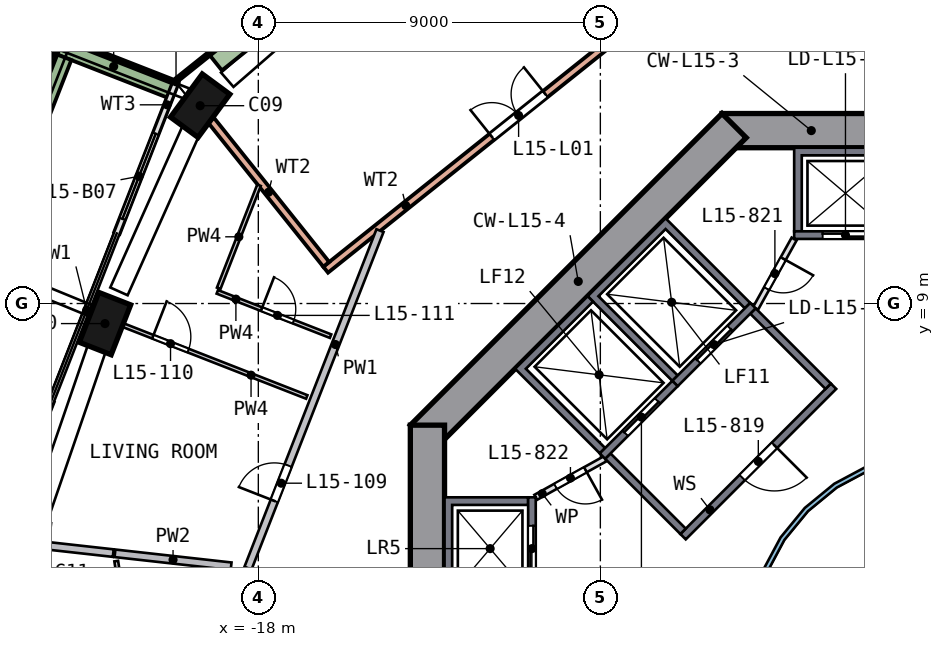
"""IFC4 building model, lengths in metres.
Left out: names, types, materials, properties, quantities, classifications, styles, units other than length and angle.
Written with IfcOpenShell. Run it as: python <this file> out.ifc"""

import sys

from ifc_helpers import new_model, si_unit, direction, frame, frame_2d, origin, origin_2d, place, context, subcontext, project, spatial, polyline, rectangle, outline, extrude, element, fill, save


model = new_model("IFC4")
c1 = context("Model", 3, precision=1e-05, world=origin(), true_north=direction((0.0, 1.0)))
c2 = subcontext(c1, "Body", "Model", "MODEL_VIEW")
j1 = project(units=[si_unit("LENGTHUNIT", "METRE"), si_unit("PLANEANGLEUNIT", "RADIAN")], contexts=[c1])
p1 = place(None, origin())
s1 = spatial("IfcSite", under=j1, at=p1, CompositionType="ELEMENT")
p2 = place(p1, origin())
s2 = spatial("IfcBuilding", under=s1, at=p2, CompositionType="ELEMENT")
p3 = place(p2, frame((0.0, 0.0, 68.0)))
s3 = spatial("IfcBuildingStorey", under=s2, at=p3, CompositionType="ELEMENT", Elevation=68.0)
p4 = place(p3, frame((-19.449, 14.318, 0.0), z_axis=(-0.067284962, -0.093058524, 0.99338454), x_axis=(0.588862787, 0.800033999, 0.114831255)))
e1 = element("IfcColumn", 1, at=p4, inside=s3, PredefinedType="COLUMN", context=c2, shape_type="SweptSolid", body=[
    extrude(rectangle(XDim=1.4, YDim=0.9, at=origin_2d()), origin(), (0.0, 0.0, 1.0), 3.211),
])
p5 = place(p3, frame((-21.987, 8.599, 0.0), z_axis=(-0.040002437, -0.104949359, 0.993672701), x_axis=(-0.361776799, -0.925474949, -0.112310579)))
e2 = element("IfcColumn", 2, at=p5, inside=s3, PredefinedType="COLUMN", context=c2, shape_type="SweptSolid", body=[
    extrude(rectangle(XDim=1.4, YDim=0.9, at=origin_2d()), origin(), (0.0, 0.0, 1.0), 3.21),
])
p6 = place(p3, frame((5.799, 13.55, 0.0), z_axis=(0.0, 0.0, 1.0), x_axis=(-1.0, 0.0, 0.0)))
e3 = element("IfcWall", 3, at=p6, inside=s3, PredefinedType="SHEAR", context=c2, shape_type="SweptSolid", body=[
    extrude(rectangle(XDim=11.598, YDim=0.9, at=frame_2d((5.799, 0.0))), origin(), (0.0, 0.0, 1.0), 3.5),
])
p7 = place(p6, frame((4.899, 0.0, 0.0)))
e4 = element("IfcOpeningElement", 4, at=p7, cuts=e3, PredefinedType="OPENING", context=c2, shape_type="SweptSolid", body=[
    extrude(rectangle(XDim=1.8, YDim=2.1, at=frame_2d((0.9, 1.05))), frame((0.0, 0.46, 0.0), z_axis=(0.0, -1.0, 0.0), x_axis=(1.0, 0.0, 0.0)), (0.0, 0.0, 1.0), 0.92),
])
p8 = place(p3, frame((-5.481, 13.682, 0.0), z_axis=(0.0, 0.0, 1.0), x_axis=(-0.707106781, -0.707106781, 0.0)))
e5 = element("IfcWall", 5, at=p8, inside=s3, PredefinedType="SHEAR", context=c2, shape_type="SweptSolid", body=[
    extrude(rectangle(XDim=11.598, YDim=0.9, at=frame_2d((5.799, 0.0))), origin(), (0.0, 0.0, 1.0), 3.5),
])
p9 = place(p3, frame((-13.55, 5.799, 0.0), z_axis=(0.0, 0.0, 1.0), x_axis=(0.0, -1.0, 0.0)))
e6 = element("IfcWall", 6, at=p9, inside=s3, PredefinedType="SHEAR", context=c2, shape_type="SweptSolid", body=[
    extrude(rectangle(XDim=11.598, YDim=0.9, at=frame_2d((5.799, 0.0))), origin(), (0.0, 0.0, 1.0), 3.5),
])
p10 = place(p9, frame((4.899, 0.0, 0.0)))
e7 = element("IfcOpeningElement", 7, at=p10, cuts=e6, PredefinedType="OPENING", context=c2, shape_type="SweptSolid", body=[
    extrude(rectangle(XDim=1.8, YDim=2.1, at=frame_2d((0.9, 1.05))), frame((0.0, 0.46, 0.0), z_axis=(0.0, -1.0, 0.0), x_axis=(1.0, 0.0, 0.0)), (0.0, 0.0, 1.0), 0.92),
])
p11 = place(p3, frame((-20.177, 14.806, 0.0), z_axis=(0.0, 0.0, 1.0), x_axis=(-0.364229957, -0.931309046, 0.0)))
e8 = element("IfcWall", 8, at=p11, inside=s3, PredefinedType="SOLIDWALL", context=c2, shape_type="SweptSolid", body=[
    extrude(rectangle(XDim=4.239, YDim=0.15, at=frame_2d((2.12, 0.0))), origin(), (0.0, 0.0, 1.0), 2.425),
])
p12 = place(p11, frame((1.439, 0.0, 0.0)))
e9 = element("IfcOpeningElement", 9, at=p12, cuts=e8, PredefinedType="OPENING", context=c2, shape_type="SweptSolid", body=[
    extrude(rectangle(XDim=2.4, YDim=2.4, at=frame_2d((1.2, 1.2))), frame((0.0, 0.085, 0.0), z_axis=(0.0, -1.0, 0.0), x_axis=(1.0, 0.0, 0.0)), (0.0, 0.0, 1.0), 0.17),
])
p13 = place(p3, frame((-23.454, 6.426, 0.0), z_axis=(0.0, 0.0, 1.0), x_axis=(-0.364257976, -0.931298087, 0.0)))
e10 = element("IfcWall", 10, at=p13, inside=s3, PredefinedType="SOLIDWALL", context=c2, shape_type="SweptSolid", body=[
    extrude(rectangle(XDim=3.842, YDim=0.15, at=frame_2d((1.921, 0.0))), origin(), (0.0, 0.0, 1.0), 2.425),
])
p14 = place(p13, frame((0.4, 0.0, 0.0)))
e11 = element("IfcOpeningElement", 11, at=p14, cuts=e10, PredefinedType="OPENING", context=c2, shape_type="SweptSolid", body=[
    extrude(rectangle(XDim=2.4, YDim=2.4, at=frame_2d((1.2, 1.2))), frame((0.0, 0.085, 0.0), z_axis=(0.0, -1.0, 0.0), x_axis=(1.0, 0.0, 0.0)), (0.0, 0.0, 1.0), 0.17),
])
p15 = place(p3, frame((-20.317, 14.656, 0.0), z_axis=(0.0, 0.0, 1.0), x_axis=(-0.931296817, 0.364261223, 0.0)))
e12 = element("IfcWall", 12, at=p15, inside=s3, PredefinedType="SOLIDWALL", context=c2, shape_type="SweptSolid", body=[
    extrude(rectangle(XDim=3.199, YDim=0.5, at=frame_2d((1.6, 0.0))), origin(), (0.0, 0.0, 1.0), 0.7),
])
p16 = place(p3, frame((-23.154, 15.498, 0.0), z_axis=(0.0, 0.0, 1.0), x_axis=(-0.364230183, -0.931308957, 0.0)))
e13 = element("IfcWall", 13, at=p16, inside=s3, PredefinedType="SOLIDWALL", context=c2, shape_type="SweptSolid", body=[
    extrude(rectangle(XDim=13.224, YDim=0.5, at=frame_2d((6.612, 0.0))), origin(), (0.0, 0.0, 1.0), 0.7),
])
p17 = place(p3, frame((-16.228, 9.89, 0.0), z_axis=(0.0, 0.0, 1.0), x_axis=(0.781086795, 0.624422468, 0.0)))
e14 = element("IfcWall", 14, at=p17, inside=s3, PredefinedType="SOLIDWALL", context=c2, shape_type="SweptSolid", body=[
    extrude(rectangle(XDim=13.0, YDim=0.2, at=frame_2d((6.5, 0.0))), origin(), (0.0, 0.0, 1.0), 3.19),
])
p18 = place(p17, frame((5.6, 0.0, 0.0)))
e15 = element("IfcOpeningElement", 15, at=p18, cuts=e14, PredefinedType="OPENING", context=c2, shape_type="SweptSolid", body=[
    extrude(rectangle(XDim=1.8, YDim=2.4, at=frame_2d((0.9, 1.2))), frame((0.0, 0.11, 0.0), z_axis=(0.0, -1.0, 0.0), x_axis=(1.0, 0.0, 0.0)), (0.0, 0.0, 1.0), 0.22),
])
p19 = place(p3, frame((-19.248, 13.827, 0.0), z_axis=(0.0, 0.0, 1.0), x_axis=(0.624425498, -0.781084373, 0.0)))
e16 = element("IfcWall", 16, at=p19, inside=s3, PredefinedType="SOLIDWALL", context=c2, shape_type="SweptSolid", body=[
    extrude(rectangle(XDim=4.861, YDim=0.2, at=frame_2d((2.43, 0.0))), origin(), (0.0, 0.0, 1.0), 3.19),
])
p20 = place(p3, frame((-10.102, 22.917, 0.0), z_axis=(0.0, 0.0, 1.0), x_axis=(-0.781083948, -0.624426029, 0.0)))
e17 = element("IfcWall", 17, at=p20, inside=s3, PredefinedType="SOLIDWALL", context=c2, shape_type="SweptSolid", body=[
    extrude(rectangle(XDim=12.84, YDim=0.1, at=frame_2d((6.42, 0.0))), origin(), (0.0, 0.0, 1.0), 0.7),
])
p21 = place(p3, frame((-15.835, 17.95, 0.0), z_axis=(0.0, 0.0, 1.0), x_axis=(-0.781095726, -0.624411296, 0.0)))
e18 = element("IfcWall", 18, at=p21, inside=s3, PredefinedType="SOLIDWALL", context=c2, shape_type="SweptSolid", body=[
    extrude(rectangle(XDim=4.198, YDim=0.5, at=frame_2d((2.099, 0.0))), origin(), (0.0, 0.0, 1.0), 0.7),
])
p22 = place(p3, origin())
e19 = element("IfcWall", 19, at=p22, inside=s3, PredefinedType="SOLIDWALL", context=c2, shape_type="SweptSolid", body=[
    extrude(outline(polyline([(-3.9, 10.9), (-3.9, 13.1), (-1.2, 13.1), (-1.2, 10.9), (-1.4, 10.9), (-1.4, 12.9), (-3.7, 12.9), (-3.7, 10.9), (-3.9, 10.9)])), origin(), (0.0, 0.0, 1.0), 3.19),
])
p23 = place(p3, frame((-1.2, 10.8, 0.0), z_axis=(0.0, 0.0, 1.0), x_axis=(-1.0, 0.0, 0.0)))
e20 = element("IfcWall", 20, at=p23, inside=s3, PredefinedType="SOLIDWALL", context=c2, shape_type="SweptSolid", body=[
    extrude(rectangle(XDim=2.7, YDim=0.2, at=frame_2d((1.35, 0.0))), origin(), (0.0, 0.0, 1.0), 3.19),
])
p24 = place(p23, frame((0.75, 0.0, 0.0)))
e21 = element("IfcOpeningElement", 21, at=p24, cuts=e20, PredefinedType="OPENING", context=c2, shape_type="SweptSolid", body=[
    extrude(rectangle(XDim=1.2, YDim=2.1, at=frame_2d((0.6, 1.05))), frame((0.0, 0.11, 0.0), z_axis=(0.0, -1.0, 0.0), x_axis=(1.0, 0.0, 0.0)), (0.0, 0.0, 1.0), 0.22),
])
p25 = place(p3, origin())
e22 = element("IfcWall", 22, at=p25, inside=s3, PredefinedType="SOLIDWALL", context=c2, shape_type="SweptSolid", body=[
    extrude(outline(polyline([(-13.1, 3.9), (-10.9, 3.9), (-10.9, 3.7), (-12.9, 3.7), (-12.9, 1.4), (-10.9, 1.4), (-10.9, 1.2), (-13.1, 1.2), (-13.1, 3.9)])), origin(), (0.0, 0.0, 1.0), 3.19),
])
p26 = place(p3, frame((-10.8, 1.2, 0.0), z_axis=(0.0, 0.0, 1.0), x_axis=(0.0, 1.0, 0.0)))
e23 = element("IfcWall", 23, at=p26, inside=s3, PredefinedType="SOLIDWALL", context=c2, shape_type="SweptSolid", body=[
    extrude(rectangle(XDim=2.7, YDim=0.2, at=frame_2d((1.35, 0.0))), origin(), (0.0, 0.0, 1.0), 3.19),
])
p27 = place(p26, frame((0.75, 0.0, 0.0)))
e24 = element("IfcOpeningElement", 24, at=p27, cuts=e23, PredefinedType="OPENING", context=c2, shape_type="SweptSolid", body=[
    extrude(rectangle(XDim=1.2, YDim=2.1, at=frame_2d((0.6, 1.05))), frame((0.0, 0.11, 0.0), z_axis=(0.0, -1.0, 0.0), x_axis=(1.0, 0.0, 0.0)), (0.0, 0.0, 1.0), 0.22),
])
p28 = place(p3, origin())
e25 = element("IfcWall", 25, at=p28, inside=s3, PredefinedType="SOLIDWALL", context=c2, shape_type="SweptSolid", body=[
    extrude(outline(polyline([(-9.334, 9.192), (-7.283, 11.243), (-5.056, 9.016), (-5.197, 8.874), (-7.283, 10.96), (-9.051, 9.192), (-6.965, 7.106), (-7.106, 6.965), (-9.334, 9.192)])), origin(), (0.0, 0.0, 1.0), 3.19),
])
p29 = place(p3, frame((-4.985, 8.945, 0.0), z_axis=(0.0, 0.0, 1.0), x_axis=(-0.707106781, -0.707106781, 0.0)))
e26 = element("IfcWall", 26, at=p29, inside=s3, PredefinedType="SOLIDWALL", context=c2, shape_type="SweptSolid", body=[
    extrude(rectangle(XDim=2.9, YDim=0.2, at=frame_2d((1.45, 0.0))), origin(), (0.0, 0.0, 1.0), 3.19),
])
p30 = place(p29, frame((0.85, 0.0, 0.0)))
e27 = element("IfcOpeningElement", 27, at=p30, cuts=e26, PredefinedType="OPENING", context=c2, shape_type="SweptSolid", body=[
    extrude(rectangle(XDim=1.2, YDim=2.1, at=frame_2d((0.6, 1.05))), frame((0.0, 0.11, 0.0), z_axis=(0.0, -1.0, 0.0), x_axis=(1.0, 0.0, 0.0)), (0.0, 0.0, 1.0), 0.22),
])
p31 = place(p3, origin())
e28 = element("IfcWall", 28, at=p31, inside=s3, PredefinedType="SOLIDWALL", context=c2, shape_type="SweptSolid", body=[
    extrude(outline(polyline([(-11.243, 7.283), (-9.334, 9.192), (-9.192, 9.051), (-10.96, 7.283), (-8.874, 5.197), (-9.016, 5.056), (-11.243, 7.283)])), origin(), (0.0, 0.0, 1.0), 3.19),
])
p32 = place(p3, frame((-7.036, 6.894, 0.0), z_axis=(0.0, 0.0, 1.0), x_axis=(-0.707106781, -0.707106781, 0.0)))
e29 = element("IfcWall", 29, at=p32, inside=s3, PredefinedType="SOLIDWALL", context=c2, shape_type="SweptSolid", body=[
    extrude(rectangle(XDim=2.7, YDim=0.2, at=frame_2d((1.35, 0.0))), origin(), (0.0, 0.0, 1.0), 3.19),
])
p33 = place(p32, frame((0.65, 0.0, 0.0)))
e30 = element("IfcOpeningElement", 30, at=p33, cuts=e29, PredefinedType="OPENING", context=c2, shape_type="SweptSolid", body=[
    extrude(rectangle(XDim=1.2, YDim=2.1, at=frame_2d((0.6, 1.05))), frame((0.0, 0.11, 0.0), z_axis=(0.0, -1.0, 0.0), x_axis=(1.0, 0.0, 0.0)), (0.0, 0.0, 1.0), 0.22),
])
p34 = place(p3, frame((-2.864, 6.823, 0.0), z_axis=(0.0, 0.0, 1.0), x_axis=(-0.707106781, -0.707106781, 0.0)))
e31 = element("IfcWall", 31, at=p34, inside=s3, PredefinedType="SOLIDWALL", context=c2, shape_type="SweptSolid", body=[
    extrude(rectangle(XDim=5.6, YDim=0.2, at=frame_2d((2.8, 0.0))), origin(), (0.0, 0.0, 1.0), 3.19),
])
p35 = place(p34, frame((2.2, 0.0, 0.0)))
e32 = element("IfcOpeningElement", 32, at=p35, cuts=e31, PredefinedType="OPENING", context=c2, shape_type="SweptSolid", body=[
    extrude(rectangle(XDim=1.2, YDim=2.1, at=frame_2d((0.6, 1.05))), frame((0.0, 0.11, 0.0), z_axis=(0.0, -1.0, 0.0), x_axis=(1.0, 0.0, 0.0)), (0.0, 0.0, 1.0), 0.22),
])
for number, where, z_axis, x_axis in (
    (33, (-3.005, 6.823, 0.0), (0.0, 0.0, 1.0), (-0.707, 0.707, 0.0)),
    (34, (-6.823, 3.005, 0.0), (0.0, 0.0, 1.0), (-0.707, 0.707, 0.0)),
):
    element("IfcWall", number, at=place(p3, frame(where, z_axis=z_axis, x_axis=x_axis)), inside=s3, PredefinedType="SOLIDWALL", context=c2, shape_type="SweptSolid", body=[
        extrude(rectangle(XDim=2.8, YDim=0.2, at=frame_2d((1.4, 0.0))), origin(), (0.0, 0.0, 1.0), 3.19),
    ])
p36 = place(p3, frame((-3.9, 10.7, 0.0), z_axis=(0.0, 0.0, 1.0), x_axis=(-0.485692555, -0.874129705, 0.0)))
e35 = element("IfcWall", 35, at=p36, inside=s3, PredefinedType="PARTITIONING", context=c2, shape_type="SweptSolid", body=[
    extrude(rectangle(XDim=2.089, YDim=0.15, at=frame_2d((1.044, 0.0))), origin(), (0.0, 0.0, 1.0), 3.19),
])
p37 = place(p36, frame((0.594, 0.0, 0.0)))
e36 = element("IfcOpeningElement", 36, at=p37, cuts=e35, PredefinedType="OPENING", context=c2, shape_type="SweptSolid", body=[
    extrude(rectangle(XDim=0.9, YDim=2.1, at=frame_2d((0.45, 1.05))), frame((0.0, 0.085, 0.0), z_axis=(0.0, -1.0, 0.0), x_axis=(1.0, 0.0, 0.0)), (0.0, 0.0, 1.0), 0.17),
])
p38 = place(p3, frame((-8.874, 4.914, 0.0), z_axis=(0.0, 0.0, 1.0), x_axis=(-0.874129705, -0.485692555, 0.0)))
e37 = element("IfcWall", 37, at=p38, inside=s3, PredefinedType="PARTITIONING", context=c2, shape_type="SweptSolid", body=[
    extrude(rectangle(XDim=2.089, YDim=0.15, at=frame_2d((1.044, 0.0))), origin(), (0.0, 0.0, 1.0), 3.19),
])
p39 = place(p38, frame((0.594, 0.0, 0.0)))
e38 = element("IfcOpeningElement", 38, at=p39, cuts=e37, PredefinedType="OPENING", context=c2, shape_type="SweptSolid", body=[
    extrude(rectangle(XDim=0.9, YDim=2.1, at=frame_2d((0.45, 1.05))), frame((0.0, 0.085, 0.0), z_axis=(0.0, -1.0, 0.0), x_axis=(1.0, 0.0, 0.0)), (0.0, 0.0, 1.0), 0.17),
])
p40 = place(p3, origin())
e39 = element("IfcWall", 39, at=p40, inside=s3, PredefinedType="SOLIDWALL", context=c2, shape_type="SweptSolid", body=[
    extrude(outline(polyline([(5.021, -0.999), (4.73, -1.959), (4.257, -2.844), (3.62, -3.62), (2.844, -4.257), (1.959, -4.73), (0.999, -5.021), (0.0, -5.12), (-0.999, -5.021), (-1.959, -4.73), (-2.844, -4.257), (-3.62, -3.62), (-4.257, -2.844), (-4.73, -1.959), (-5.021, -0.999), (-5.12, 0.0), (-5.021, 0.999), (-4.73, 1.959), (-4.257, 2.844), (-3.62, 3.62), (-2.844, 4.257), (-1.959, 4.73), (-0.999, 5.021), (0.0, 5.12), (0.999, 5.021), (1.959, 4.73), (2.844, 4.257), (3.62, 3.62), (4.257, 2.844), (4.73, 1.959), (5.021, 0.999), (5.12, 0.0), (5.021, -0.999)]), holes=[polyline([(4.904, 0.976), (4.619, 1.913), (4.157, 2.778), (3.535, 3.535), (2.778, 4.157), (1.913, 4.619), (0.976, 4.904), (0.0, 5.0), (-0.976, 4.904), (-1.913, 4.619), (-2.778, 4.157), (-3.535, 3.535), (-4.157, 2.778), (-4.619, 1.913), (-4.904, 0.976), (-5.0, 0.0), (-4.904, -0.976), (-4.619, -1.913), (-4.157, -2.778), (-3.535, -3.535), (-2.778, -4.157), (-1.913, -4.619), (-0.976, -4.904), (0.0, -5.0), (0.976, -4.904), (1.913, -4.619), (2.778, -4.157), (3.535, -3.535), (4.157, -2.778), (4.619, -1.913), (4.904, -0.976), (5.0, 0.0), (4.904, 0.976)])]), origin(), (0.0, 0.0, 1.0), 3.19),
])
p41 = place(p3, frame((-18.271, 2.037, 0.0), z_axis=(0.0, 0.0, 1.0), x_axis=(0.364215942, 0.931314527, 0.0)))
e40 = element("IfcWall", 40, at=p41, inside=s3, PredefinedType="SOLIDWALL", context=c2, shape_type="SweptSolid", body=[
    extrude(rectangle(XDim=9.537, YDim=0.2, at=frame_2d((4.768, 0.0))), origin(), (0.0, 0.0, 1.0), 3.19),
])
p42 = place(p41, frame((1.9, 0.0, 0.0)))
e41 = element("IfcOpeningElement", 41, at=p42, cuts=e40, PredefinedType="OPENING", context=c2, shape_type="SweptSolid", body=[
    extrude(rectangle(XDim=1.0, YDim=2.1, at=frame_2d((0.5, 1.05))), frame((0.0, 0.11, 0.0), z_axis=(0.0, -1.0, 0.0), x_axis=(1.0, 0.0, 0.0)), (0.0, 0.0, 1.0), 0.22),
])
p43 = place(p3, frame((-21.817, 2.432, 0.0), z_axis=(0.0, 0.0, 1.0), x_axis=(-0.993849082, 0.110742952, 0.0)))
e42 = element("IfcWall", 42, at=p43, inside=s3, PredefinedType="SOLIDWALL", context=c2, shape_type="SweptSolid", body=[
    extrude(rectangle(XDim=3.011, YDim=0.2, at=frame_2d((1.506, 0.0))), origin(), (0.0, 0.0, 1.0), 2.69),
])
p44 = place(p3, frame((-18.716, 2.086, 0.0), z_axis=(0.0, 0.0, 1.0), x_axis=(-0.993846884, 0.110762675, 0.0)))
e43 = element("IfcWall", 43, at=p44, inside=s3, PredefinedType="SOLIDWALL", context=c2, shape_type="SweptSolid", body=[
    extrude(rectangle(XDim=3.075, YDim=0.2, at=frame_2d((1.537, 0.0))), origin(), (0.0, 0.0, 1.0), 3.19),
])
p45 = place(p3, frame((-21.182, -1.44, 0.0), z_axis=(0.0, 0.0, 1.0), x_axis=(-0.150219315, 0.988652698, 0.0)))
e44 = element("IfcWall", 44, at=p45, inside=s3, PredefinedType="PARTITIONING", context=c2, shape_type="SweptSolid", body=[
    extrude(rectangle(XDim=3.704, YDim=0.1, at=frame_2d((1.852, 0.0))), origin(), (0.0, 0.0, 1.0), 3.19),
])
p46 = place(p3, frame((-22.452, 8.781, 0.0), z_axis=(0.0, 0.0, 1.0), x_axis=(0.93131012, -0.36422721, 0.0)))
e45 = element("IfcWall", 45, at=p46, inside=s3, PredefinedType="PARTITIONING", context=c2, shape_type="SweptSolid", body=[
    extrude(rectangle(XDim=6.15, YDim=0.1, at=frame_2d((3.075, 0.0))), origin(), (0.0, 0.0, 1.0), 3.19),
])
p47 = place(p46, frame((1.8, 0.0, 0.0)))
e46 = element("IfcOpeningElement", 46, at=p47, cuts=e45, PredefinedType="OPENING", context=c2, shape_type="SweptSolid", body=[
    extrude(rectangle(XDim=1.0, YDim=2.1, at=frame_2d((0.5, 1.05))), frame((0.0, 0.06, 0.0), z_axis=(0.0, -1.0, 0.0), x_axis=(1.0, 0.0, 0.0)), (0.0, 0.0, 1.0), 0.12),
])
p48 = place(p3, frame((-17.982, 12.112, 0.0), z_axis=(0.0, 0.0, 1.0), x_axis=(-0.364209666, -0.931316981, 0.0)))
e47 = element("IfcWall", 47, at=p48, inside=s3, PredefinedType="PARTITIONING", context=c2, shape_type="SweptSolid", body=[
    extrude(rectangle(XDim=2.912, YDim=0.1, at=frame_2d((1.456, 0.0))), origin(), (0.0, 0.0, 1.0), 3.19),
])
p49 = place(p3, frame((-19.079, 9.307, 0.0), z_axis=(0.0, 0.0, 1.0), x_axis=(0.931311427, -0.364223868, 0.0)))
e48 = element("IfcWall", 48, at=p49, inside=s3, PredefinedType="PARTITIONING", context=c2, shape_type="SweptSolid", body=[
    extrude(rectangle(XDim=3.2, YDim=0.1, at=frame_2d((1.6, 0.0))), origin(), (0.0, 0.0, 1.0), 3.19),
])
p50 = place(p49, frame((1.25, 0.0, 0.0)))
e49 = element("IfcOpeningElement", 49, at=p50, cuts=e48, PredefinedType="OPENING", context=c2, shape_type="SweptSolid", body=[
    extrude(rectangle(XDim=0.9, YDim=2.1, at=frame_2d((0.45, 1.05))), frame((0.0, 0.06, 0.0), z_axis=(0.0, -1.0, 0.0), x_axis=(1.0, 0.0, 0.0)), (0.0, 0.0, 1.0), 0.12),
])
p51 = place(p12, origin())
e50 = element("IfcDoor", 50, at=p51, inside=s3, OperationType="SLIDING_TO_LEFT", PredefinedType="DOOR", context=c2, shape_type="SweptSolid", body=[
    extrude(rectangle(XDim=2.4, YDim=2.4, at=frame_2d((1.2, 1.2))), frame((0.0, 0.025, 0.0), z_axis=(0.0, -1.0, 0.0), x_axis=(1.0, 0.0, 0.0)), (0.0, 0.0, 1.0), 0.05),
])
fill(e9, e50)
p52 = place(p18, origin())
e51 = element("IfcDoor", 51, at=p52, inside=s3, OperationType="DOUBLE_DOOR_SINGLE_SWING", PredefinedType="DOOR", context=c2, shape_type="SweptSolid", body=[
    extrude(rectangle(XDim=1.8, YDim=2.4, at=frame_2d((0.9, 1.2))), frame((0.0, 0.025, 0.0), z_axis=(0.0, -1.0, 0.0), x_axis=(1.0, 0.0, 0.0)), (0.0, 0.0, 1.0), 0.05),
])
fill(e15, e51)
p53 = place(p24, origin())
e52 = element("IfcDoor", 52, at=p53, inside=s3, OperationType="DOUBLE_DOOR_SLIDING", PredefinedType="DOOR", context=c2, shape_type="SweptSolid", body=[
    extrude(rectangle(XDim=1.2, YDim=2.1, at=frame_2d((0.6, 1.05))), frame((0.0, 0.025, 0.0), z_axis=(0.0, -1.0, 0.0), x_axis=(1.0, 0.0, 0.0)), (0.0, 0.0, 1.0), 0.05),
])
fill(e21, e52)
p54 = place(p27, origin())
e53 = element("IfcDoor", 53, at=p54, inside=s3, OperationType="DOUBLE_DOOR_SLIDING", PredefinedType="DOOR", context=c2, shape_type="SweptSolid", body=[
    extrude(rectangle(XDim=1.2, YDim=2.1, at=frame_2d((0.6, 1.05))), frame((0.0, 0.025, 0.0), z_axis=(0.0, -1.0, 0.0), x_axis=(1.0, 0.0, 0.0)), (0.0, 0.0, 1.0), 0.05),
])
fill(e24, e53)
p55 = place(p30, origin())
e54 = element("IfcDoor", 54, at=p55, inside=s3, OperationType="DOUBLE_DOOR_SLIDING", PredefinedType="DOOR", context=c2, shape_type="SweptSolid", body=[
    extrude(rectangle(XDim=1.2, YDim=2.1, at=frame_2d((0.6, 1.05))), frame((0.0, 0.025, 0.0), z_axis=(0.0, -1.0, 0.0), x_axis=(1.0, 0.0, 0.0)), (0.0, 0.0, 1.0), 0.05),
])
fill(e27, e54)
p56 = place(p33, origin())
e55 = element("IfcDoor", 55, at=p56, inside=s3, OperationType="DOUBLE_DOOR_SLIDING", PredefinedType="DOOR", context=c2, shape_type="SweptSolid", body=[
    extrude(rectangle(XDim=1.2, YDim=2.1, at=frame_2d((0.6, 1.05))), frame((0.0, 0.025, 0.0), z_axis=(0.0, -1.0, 0.0), x_axis=(1.0, 0.0, 0.0)), (0.0, 0.0, 1.0), 0.05),
])
fill(e30, e55)
p57 = place(p35, origin())
e56 = element("IfcDoor", 56, at=p57, inside=s3, OperationType="SINGLE_SWING_LEFT", PredefinedType="DOOR", context=c2, shape_type="SweptSolid", body=[
    extrude(rectangle(XDim=1.2, YDim=2.1, at=frame_2d((0.6, 1.05))), frame((0.0, 0.025, 0.0), z_axis=(0.0, -1.0, 0.0), x_axis=(1.0, 0.0, 0.0)), (0.0, 0.0, 1.0), 0.05),
])
fill(e32, e56)
p58 = place(p37, origin())
e57 = element("IfcDoor", 57, at=p58, inside=s3, OperationType="SINGLE_SWING_LEFT", PredefinedType="DOOR", context=c2, shape_type="SweptSolid", body=[
    extrude(rectangle(XDim=0.9, YDim=2.1, at=frame_2d((0.45, 1.05))), frame((0.0, 0.025, 0.0), z_axis=(0.0, -1.0, 0.0), x_axis=(1.0, 0.0, 0.0)), (0.0, 0.0, 1.0), 0.05),
])
fill(e36, e57)
p59 = place(p39, origin())
e58 = element("IfcDoor", 58, at=p59, inside=s3, OperationType="SINGLE_SWING_LEFT", PredefinedType="DOOR", context=c2, shape_type="SweptSolid", body=[
    extrude(rectangle(XDim=0.9, YDim=2.1, at=frame_2d((0.45, 1.05))), frame((0.0, 0.025, 0.0), z_axis=(0.0, -1.0, 0.0), x_axis=(1.0, 0.0, 0.0)), (0.0, 0.0, 1.0), 0.05),
])
fill(e38, e58)
p60 = place(p42, origin())
e59 = element("IfcDoor", 59, at=p60, inside=s3, OperationType="SINGLE_SWING_LEFT", PredefinedType="DOOR", context=c2, shape_type="SweptSolid", body=[
    extrude(rectangle(XDim=1.0, YDim=2.1, at=frame_2d((0.5, 1.05))), frame((0.0, 0.025, 0.0), z_axis=(0.0, -1.0, 0.0), x_axis=(1.0, 0.0, 0.0)), (0.0, 0.0, 1.0), 0.05),
])
fill(e41, e59)
p61 = place(p47, origin())
e60 = element("IfcDoor", 60, at=p61, inside=s3, OperationType="SINGLE_SWING_LEFT", PredefinedType="DOOR", context=c2, shape_type="SweptSolid", body=[
    extrude(rectangle(XDim=1.0, YDim=2.1, at=frame_2d((0.5, 1.05))), frame((0.0, 0.025, 0.0), z_axis=(0.0, -1.0, 0.0), x_axis=(1.0, 0.0, 0.0)), (0.0, 0.0, 1.0), 0.05),
])
fill(e46, e60)
p62 = place(p50, origin())
e61 = element("IfcDoor", 61, at=p62, inside=s3, OperationType="SINGLE_SWING_LEFT", PredefinedType="DOOR", context=c2, shape_type="SweptSolid", body=[
    extrude(rectangle(XDim=0.9, YDim=2.1, at=frame_2d((0.45, 1.05))), frame((0.0, 0.025, 0.0), z_axis=(0.0, -1.0, 0.0), x_axis=(1.0, 0.0, 0.0)), (0.0, 0.0, 1.0), 0.05),
])
fill(e49, e61)
save(model, sys.argv[1])
